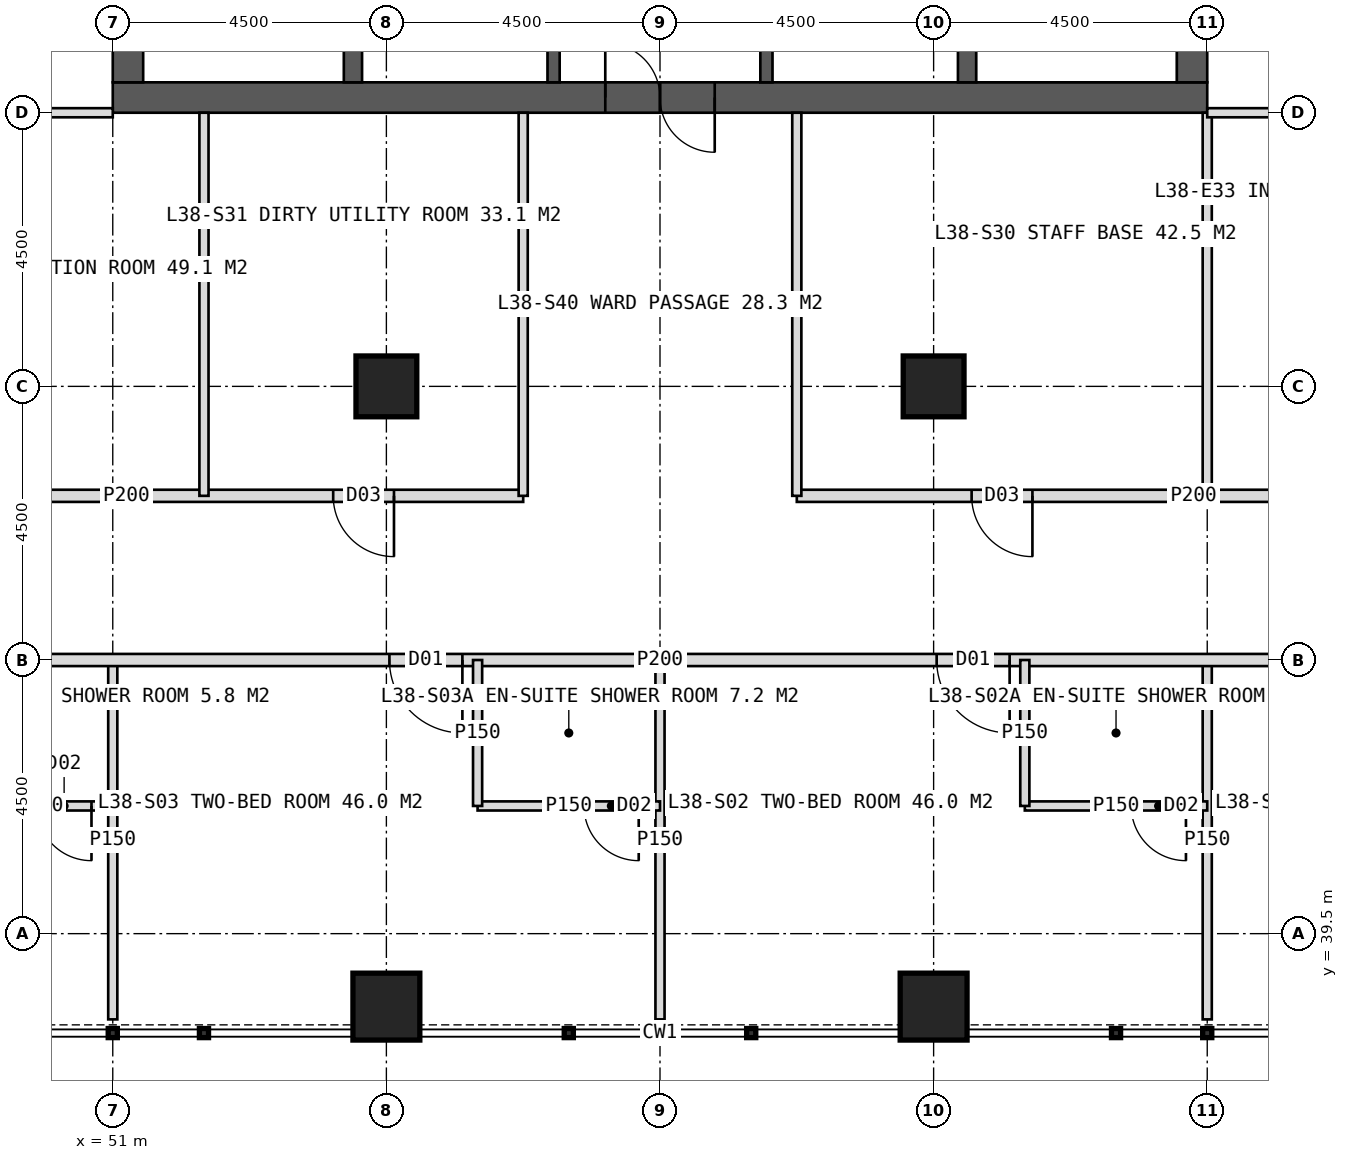
"""IFC4 building model, lengths in metres.
Left out: names, types, materials, properties, quantities, classifications, styles, units other than length and angle.
Written with IfcOpenShell. Run it as: python <this file> out.ifc"""

import sys

from ifc_helpers import new_model, si_unit, direction, frame, frame_2d, origin, origin_2d, place, context, subcontext, project, spatial, rectangle, hollow_rectangle, extrude, element, fill, save


model = new_model("IFC4")
c1 = context("Model", 3, precision=1e-05, world=origin(), true_north=direction((0.0, 1.0)))
c2 = subcontext(c1, "Body", "Model", "MODEL_VIEW")
j1 = project(units=[si_unit("LENGTHUNIT", "METRE"), si_unit("PLANEANGLEUNIT", "RADIAN")], contexts=[c1])
p1 = place(None, origin())
s1 = spatial("IfcSite", under=j1, at=p1, CompositionType="ELEMENT")
p2 = place(p1, origin())
s2 = spatial("IfcBuilding", under=s1, at=p2, CompositionType="ELEMENT")
p3 = place(p2, frame((0.0, 0.0, 160.0)))
s3 = spatial("IfcBuildingStorey", under=s2, at=p3, CompositionType="ELEMENT", Elevation=160.0)
p4 = place(p3, frame((51.0, 53.25, 0.0), z_axis=(0.0, 0.0, 1.0), x_axis=(1.0, 0.0, 0.0)))
e1 = element("IfcWall", 1, at=p4, inside=s3, PredefinedType="SHEAR", context=c2, shape_type="SweptSolid", body=[
    extrude(rectangle(XDim=18.0, YDim=0.5, at=frame_2d((9.0, 0.0))), origin(), (0.0, 0.0, 1.0), 4.0),
])
p5 = place(p4, frame((8.1, 0.0, 0.0)))
e2 = element("IfcOpeningElement", 2, at=p5, cuts=e1, PredefinedType="OPENING", context=c2, shape_type="SweptSolid", body=[
    extrude(rectangle(XDim=1.8, YDim=2.2, at=frame_2d((0.9, 1.1))), frame((0.0, 0.26, 0.0), z_axis=(0.0, -1.0, 0.0), x_axis=(1.0, 0.0, 0.0)), (0.0, 0.0, 1.0), 0.52),
])
p6 = place(p3, frame((51.25, 53.5, 0.0), z_axis=(0.0, 0.0, 1.0), x_axis=(0.0, 1.0, 0.0)))
e3 = element("IfcWall", 3, at=p6, inside=s3, PredefinedType="SHEAR", context=c2, shape_type="SweptSolid", body=[
    extrude(rectangle(XDim=17.0, YDim=0.5, at=frame_2d((8.5, 0.0))), origin(), (0.0, 0.0, 1.0), 4.0),
])
p7 = place(p6, frame((6.0, 0.0, 0.0)))
e4 = element("IfcOpeningElement", 4, at=p7, cuts=e3, PredefinedType="OPENING", context=c2, shape_type="SweptSolid", body=[
    extrude(rectangle(XDim=1.5, YDim=2.2, at=frame_2d((0.75, 1.1))), frame((0.0, 0.26, 0.0), z_axis=(0.0, -1.0, 0.0), x_axis=(1.0, 0.0, 0.0)), (0.0, 0.0, 1.0), 0.52),
])
p8 = place(p3, frame((68.75, 53.5, 0.0), z_axis=(0.0, 0.0, 1.0), x_axis=(0.0, 1.0, 0.0)))
e5 = element("IfcWall", 5, at=p8, inside=s3, PredefinedType="SHEAR", context=c2, shape_type="SweptSolid", body=[
    extrude(rectangle(XDim=17.0, YDim=0.5, at=frame_2d((8.5, 0.0))), origin(), (0.0, 0.0, 1.0), 4.0),
])
p9 = place(p8, frame((9.5, 0.0, 0.0)))
e6 = element("IfcOpeningElement", 6, at=p9, cuts=e5, PredefinedType="OPENING", context=c2, shape_type="SweptSolid", body=[
    extrude(rectangle(XDim=1.5, YDim=2.2, at=frame_2d((0.75, 1.1))), frame((0.0, 0.26, 0.0), z_axis=(0.0, -1.0, 0.0), x_axis=(1.0, 0.0, 0.0)), (0.0, 0.0, 1.0), 0.52),
])
for number, where, z_axis, x_axis in (
    (7, (54.95, 53.5, 0.0), (0.0, 0.0, 1.0), (0.0, 1.0, 0.0)),
    (8, (65.05, 53.5, 0.0), (0.0, 0.0, 1.0), (0.0, 1.0, 0.0)),
):
    element("IfcWall", number, at=place(p3, frame(where, z_axis=z_axis, x_axis=x_axis)), inside=s3, PredefinedType="SHEAR", context=c2, shape_type="SweptSolid", body=[
        extrude(rectangle(XDim=17.0, YDim=0.3, at=frame_2d((8.5, 0.0))), origin(), (0.0, 0.0, 1.0), 4.0),
    ])
p10 = place(p3, frame((58.25, 53.5, 0.0), z_axis=(0.0, 0.0, 1.0), x_axis=(0.0, 1.0, 0.0)))
e9 = element("IfcWall", 9, at=p10, inside=s3, PredefinedType="SHEAR", context=c2, shape_type="SweptSolid", body=[
    extrude(rectangle(XDim=17.0, YDim=0.2, at=frame_2d((8.5, 0.0))), origin(), (0.0, 0.0, 1.0), 4.0),
])
p11 = place(p10, frame((1.375, 0.0, 0.0)))
e10 = element("IfcOpeningElement", 10, at=p11, cuts=e9, PredefinedType="OPENING", context=c2, shape_type="SweptSolid", body=[
    extrude(rectangle(XDim=1.4, YDim=2.2, at=frame_2d((0.7, 1.1))), frame((0.0, 0.11, 0.0), z_axis=(0.0, -1.0, 0.0), x_axis=(1.0, 0.0, 0.0)), (0.0, 0.0, 1.0), 0.22),
])
p12 = place(p10, frame((5.675, 0.0, 0.0)))
e11 = element("IfcOpeningElement", 11, at=p12, cuts=e9, PredefinedType="OPENING", context=c2, shape_type="SweptSolid", body=[
    extrude(rectangle(XDim=1.4, YDim=2.2, at=frame_2d((0.7, 1.1))), frame((0.0, 0.11, 0.0), z_axis=(0.0, -1.0, 0.0), x_axis=(1.0, 0.0, 0.0)), (0.0, 0.0, 1.0), 0.22),
])
p13 = place(p3, frame((61.75, 53.5, 0.0), z_axis=(0.0, 0.0, 1.0), x_axis=(0.0, 1.0, 0.0)))
e12 = element("IfcWall", 12, at=p13, inside=s3, PredefinedType="SHEAR", context=c2, shape_type="SweptSolid", body=[
    extrude(rectangle(XDim=17.0, YDim=0.2, at=frame_2d((8.5, 0.0))), origin(), (0.0, 0.0, 1.0), 4.0),
])
p14 = place(p13, frame((1.375, 0.0, 0.0)))
e13 = element("IfcOpeningElement", 13, at=p14, cuts=e12, PredefinedType="OPENING", context=c2, shape_type="SweptSolid", body=[
    extrude(rectangle(XDim=1.4, YDim=2.2, at=frame_2d((0.7, 1.1))), frame((0.0, 0.11, 0.0), z_axis=(0.0, -1.0, 0.0), x_axis=(1.0, 0.0, 0.0)), (0.0, 0.0, 1.0), 0.22),
])
p15 = place(p13, frame((5.675, 0.0, 0.0)))
e14 = element("IfcOpeningElement", 14, at=p15, cuts=e12, PredefinedType="OPENING", context=c2, shape_type="SweptSolid", body=[
    extrude(rectangle(XDim=1.4, YDim=2.2, at=frame_2d((0.7, 1.1))), frame((0.0, 0.11, 0.0), z_axis=(0.0, -1.0, 0.0), x_axis=(1.0, 0.0, 0.0)), (0.0, 0.0, 1.0), 0.22),
])
for number, where, z_axis, x_axis in (
    (15, (55.5, 48.5, 0.0), (0.0, 0.0, 1.0), (1.0, 0.0, 0.0)),
    (16, (64.5, 48.5, 0.0), (0.0, 0.0, 1.0), (1.0, 0.0, 0.0)),
):
    element("IfcColumn", number, at=place(p3, frame(where, z_axis=z_axis, x_axis=x_axis)), inside=s3, PredefinedType="COLUMN", context=c2, shape_type="SweptSolid", body=[
        extrude(hollow_rectangle(XDim=1.0, YDim=1.0, WallThickness=0.1, at=origin_2d()), origin(), (0.0, 0.0, 1.0), 4.0),
    ])
for number, where, z_axis, x_axis in (
    (17, (55.5, 38.3, 0.0), (0.0, 0.0, 1.0), (1.0, 0.0, 0.0)),
    (18, (64.5, 38.3, 0.0), (0.0, 0.0, 1.0), (1.0, 0.0, 0.0)),
):
    element("IfcColumn", number, at=place(p3, frame(where, z_axis=z_axis, x_axis=x_axis)), inside=s3, PredefinedType="COLUMN", context=c2, shape_type="SweptSolid", body=[
        extrude(hollow_rectangle(XDim=1.1, YDim=1.1, WallThickness=0.1, at=origin_2d()), origin(), (0.0, 0.0, 1.0), 4.0),
    ])
p16 = place(p3, frame((51.0, 53.0, 0.0), z_axis=(0.0, 0.0, 1.0), x_axis=(-1.0, 0.0, 0.0)))
e19 = element("IfcWall", 19, at=p16, inside=s3, PredefinedType="PARTITIONING", context=c2, shape_type="SweptSolid", body=[
    extrude(rectangle(XDim=6.3, YDim=0.15, at=frame_2d((3.15, 0.0))), origin(), (0.0, 0.0, 1.0), 3.75),
])
p17 = place(p3, frame((69.0, 44.0, 0.0), z_axis=(0.0, 0.0, 1.0), x_axis=(0.0, -1.0, 0.0)))
e20 = element("IfcWall", 20, at=p17, inside=s3, PredefinedType="PARTITIONING", context=c2, shape_type="SweptSolid", body=[
    extrude(rectangle(XDim=5.91, YDim=0.15, at=frame_2d((2.955, 0.0))), origin(), (0.0, 0.0, 1.0), 3.75),
])
p18 = place(p3, frame((60.0, 44.0, 0.0), z_axis=(0.0, 0.0, 1.0), x_axis=(0.0, -1.0, 0.0)))
e21 = element("IfcWall", 21, at=p18, inside=s3, PredefinedType="PARTITIONING", context=c2, shape_type="SweptSolid", body=[
    extrude(rectangle(XDim=5.91, YDim=0.15, at=frame_2d((2.955, 0.0))), origin(), (0.0, 0.0, 1.0), 2.95),
])
p19 = place(p3, frame((51.0, 44.0, 0.0), z_axis=(0.0, 0.0, 1.0), x_axis=(0.0, -1.0, 0.0)))
e22 = element("IfcWall", 22, at=p19, inside=s3, PredefinedType="PARTITIONING", context=c2, shape_type="SweptSolid", body=[
    extrude(rectangle(XDim=5.91, YDim=0.15, at=frame_2d((2.955, 0.0))), origin(), (0.0, 0.0, 1.0), 3.75),
])
p20 = place(p3, frame((78.0, 44.0, 0.0), z_axis=(0.0, 0.0, 1.0), x_axis=(-1.0, 0.0, 0.0)))
e23 = element("IfcWall", 23, at=p20, inside=s3, PredefinedType="PARTITIONING", context=c2, shape_type="SweptSolid", body=[
    extrude(rectangle(XDim=36.0, YDim=0.2, at=frame_2d((18.0, 0.0))), origin(), (0.0, 0.0, 1.0), 3.75),
])
p21 = place(p20, frame((3.25, 0.0, 0.0)))
e24 = element("IfcOpeningElement", 24, at=p21, cuts=e23, PredefinedType="OPENING", context=c2, shape_type="SweptSolid", body=[
    extrude(rectangle(XDim=1.2, YDim=2.2, at=frame_2d((0.6, 1.1))), frame((0.0, 0.11, 0.0), z_axis=(0.0, -1.0, 0.0), x_axis=(1.0, 0.0, 0.0)), (0.0, 0.0, 1.0), 0.22),
])
p22 = place(p20, frame((12.25, 0.0, 0.0)))
e25 = element("IfcOpeningElement", 25, at=p22, cuts=e23, PredefinedType="OPENING", context=c2, shape_type="SweptSolid", body=[
    extrude(rectangle(XDim=1.2, YDim=2.2, at=frame_2d((0.6, 1.1))), frame((0.0, 0.11, 0.0), z_axis=(0.0, -1.0, 0.0), x_axis=(1.0, 0.0, 0.0)), (0.0, 0.0, 1.0), 0.22),
])
p23 = place(p20, frame((21.25, 0.0, 0.0)))
e26 = element("IfcOpeningElement", 26, at=p23, cuts=e23, PredefinedType="OPENING", context=c2, shape_type="SweptSolid", body=[
    extrude(rectangle(XDim=1.2, YDim=2.2, at=frame_2d((0.6, 1.1))), frame((0.0, 0.11, 0.0), z_axis=(0.0, -1.0, 0.0), x_axis=(1.0, 0.0, 0.0)), (0.0, 0.0, 1.0), 0.22),
])
p24 = place(p20, frame((29.65, 0.0, 0.0)))
e27 = element("IfcOpeningElement", 27, at=p24, cuts=e23, PredefinedType="OPENING", context=c2, shape_type="SweptSolid", body=[
    extrude(rectangle(XDim=1.2, YDim=2.2, at=frame_2d((0.6, 1.1))), frame((0.0, 0.11, 0.0), z_axis=(0.0, -1.0, 0.0), x_axis=(1.0, 0.0, 0.0)), (0.0, 0.0, 1.0), 0.22),
])
p25 = place(p3, frame((69.0, 41.6, 0.0), z_axis=(0.0, 0.0, 1.0), x_axis=(-1.0, 0.0, 0.0)))
e28 = element("IfcWall", 28, at=p25, inside=s3, PredefinedType="PARTITIONING", context=c2, shape_type="SweptSolid", body=[
    extrude(rectangle(XDim=3.0, YDim=0.15, at=frame_2d((1.5, 0.0))), origin(), (0.0, 0.0, 1.0), 3.75),
])
p26 = place(p25, frame((0.35, 0.0, 0.0)))
e29 = element("IfcOpeningElement", 29, at=p26, cuts=e28, PredefinedType="OPENING", context=c2, shape_type="SweptSolid", body=[
    extrude(rectangle(XDim=0.9, YDim=2.1, at=frame_2d((0.45, 1.05))), frame((0.0, 0.085, 0.0), z_axis=(0.0, -1.0, 0.0), x_axis=(1.0, 0.0, 0.0)), (0.0, 0.0, 1.0), 0.17),
])
p27 = place(p3, frame((66.0, 44.0, 0.0), z_axis=(0.0, 0.0, 1.0), x_axis=(0.0, -1.0, 0.0)))
e30 = element("IfcWall", 30, at=p27, inside=s3, PredefinedType="PARTITIONING", context=c2, shape_type="SweptSolid", body=[
    extrude(rectangle(XDim=2.4, YDim=0.15, at=frame_2d((1.2, 0.0))), origin(), (0.0, 0.0, 1.0), 3.75),
])
p28 = place(p3, frame((60.0, 41.6, 0.0), z_axis=(0.0, 0.0, 1.0), x_axis=(-1.0, 0.0, 0.0)))
e31 = element("IfcWall", 31, at=p28, inside=s3, PredefinedType="PARTITIONING", context=c2, shape_type="SweptSolid", body=[
    extrude(rectangle(XDim=3.0, YDim=0.15, at=frame_2d((1.5, 0.0))), origin(), (0.0, 0.0, 1.0), 3.75),
])
p29 = place(p28, frame((0.35, 0.0, 0.0)))
e32 = element("IfcOpeningElement", 32, at=p29, cuts=e31, PredefinedType="OPENING", context=c2, shape_type="SweptSolid", body=[
    extrude(rectangle(XDim=0.9, YDim=2.1, at=frame_2d((0.45, 1.05))), frame((0.0, 0.085, 0.0), z_axis=(0.0, -1.0, 0.0), x_axis=(1.0, 0.0, 0.0)), (0.0, 0.0, 1.0), 0.17),
])
p30 = place(p3, frame((57.0, 44.0, 0.0), z_axis=(0.0, 0.0, 1.0), x_axis=(0.0, -1.0, 0.0)))
e33 = element("IfcWall", 33, at=p30, inside=s3, PredefinedType="PARTITIONING", context=c2, shape_type="SweptSolid", body=[
    extrude(rectangle(XDim=2.4, YDim=0.15, at=frame_2d((1.2, 0.0))), origin(), (0.0, 0.0, 1.0), 3.75),
])
p31 = place(p3, frame((51.0, 41.6, 0.0), z_axis=(0.0, 0.0, 1.0), x_axis=(-1.0, 0.0, 0.0)))
e34 = element("IfcWall", 34, at=p31, inside=s3, PredefinedType="PARTITIONING", context=c2, shape_type="SweptSolid", body=[
    extrude(rectangle(XDim=2.4, YDim=0.15, at=frame_2d((1.2, 0.0))), origin(), (0.0, 0.0, 1.0), 3.75),
])
p32 = place(p31, frame((0.35, 0.0, 0.0)))
e35 = element("IfcOpeningElement", 35, at=p32, cuts=e34, PredefinedType="OPENING", context=c2, shape_type="SweptSolid", body=[
    extrude(rectangle(XDim=0.9, YDim=2.1, at=frame_2d((0.45, 1.05))), frame((0.0, 0.085, 0.0), z_axis=(0.0, -1.0, 0.0), x_axis=(1.0, 0.0, 0.0)), (0.0, 0.0, 1.0), 0.17),
])
p33 = place(p3, frame((69.0, 53.0, 0.0), z_axis=(0.0, 0.0, 1.0), x_axis=(0.0, -1.0, 0.0)))
e36 = element("IfcWall", 36, at=p33, inside=s3, PredefinedType="PARTITIONING", context=c2, shape_type="SweptSolid", body=[
    extrude(rectangle(XDim=6.3, YDim=0.15, at=frame_2d((3.15, 0.0))), origin(), (0.0, 0.0, 1.0), 3.75),
])
p34 = place(p3, frame((75.3, 46.7, 0.0), z_axis=(0.0, 0.0, 1.0), x_axis=(-1.0, 0.0, 0.0)))
e37 = element("IfcWall", 37, at=p34, inside=s3, PredefinedType="PARTITIONING", context=c2, shape_type="SweptSolid", body=[
    extrude(rectangle(XDim=13.05, YDim=0.2, at=frame_2d((6.525, 0.0))), origin(), (0.0, 0.0, 1.0), 3.75),
])
p35 = place(p34, frame((9.175, 0.0, 0.0)))
e38 = element("IfcOpeningElement", 38, at=p35, cuts=e37, PredefinedType="OPENING", context=c2, shape_type="SweptSolid", body=[
    extrude(rectangle(XDim=1.0, YDim=2.1, at=frame_2d((0.5, 1.05))), frame((0.0, 0.11, 0.0), z_axis=(0.0, -1.0, 0.0), x_axis=(1.0, 0.0, 0.0)), (0.0, 0.0, 1.0), 0.22),
])
p36 = place(p3, frame((57.75, 46.7, 0.0), z_axis=(0.0, 0.0, 1.0), x_axis=(-1.0, 0.0, 0.0)))
e39 = element("IfcWall", 39, at=p36, inside=s3, PredefinedType="PARTITIONING", context=c2, shape_type="SweptSolid", body=[
    extrude(rectangle(XDim=13.05, YDim=0.2, at=frame_2d((6.525, 0.0))), origin(), (0.0, 0.0, 1.0), 3.75),
])
p37 = place(p36, frame((2.125, 0.0, 0.0)))
e40 = element("IfcOpeningElement", 40, at=p37, cuts=e39, PredefinedType="OPENING", context=c2, shape_type="SweptSolid", body=[
    extrude(rectangle(XDim=1.0, YDim=2.1, at=frame_2d((0.5, 1.05))), frame((0.0, 0.11, 0.0), z_axis=(0.0, -1.0, 0.0), x_axis=(1.0, 0.0, 0.0)), (0.0, 0.0, 1.0), 0.22),
])
p38 = place(p36, frame((8.65, 0.0, 0.0)))
e41 = element("IfcOpeningElement", 41, at=p38, cuts=e39, PredefinedType="OPENING", context=c2, shape_type="SweptSolid", body=[
    extrude(rectangle(XDim=1.0, YDim=2.1, at=frame_2d((0.5, 1.05))), frame((0.0, 0.11, 0.0), z_axis=(0.0, -1.0, 0.0), x_axis=(1.0, 0.0, 0.0)), (0.0, 0.0, 1.0), 0.22),
])
for number, where, z_axis, x_axis in (
    (42, (62.25, 53.0, 0.0), (0.0, 0.0, 1.0), (0.0, -1.0, 0.0)),
    (43, (57.75, 53.0, 0.0), (0.0, 0.0, 1.0), (0.0, -1.0, 0.0)),
    (44, (52.5, 53.0, 0.0), (0.0, 0.0, 1.0), (0.0, -1.0, 0.0)),
    (45, (69.0, 53.0, 0.0), (0.0, 0.0, 1.0), (1.0, 0.0, 0.0)),
):
    element("IfcWall", number, at=place(p3, frame(where, z_axis=z_axis, x_axis=x_axis)), inside=s3, PredefinedType="PARTITIONING", context=c2, shape_type="SweptSolid", body=[
        extrude(rectangle(XDim=6.3, YDim=0.15, at=frame_2d((3.15, 0.0))), origin(), (0.0, 0.0, 1.0), 3.75),
    ])
p39 = place(p22, origin())
e46 = element("IfcDoor", 46, at=p39, inside=s3, OperationType="SINGLE_SWING_LEFT", PredefinedType="DOOR", context=c2, shape_type="SweptSolid", body=[
    extrude(rectangle(XDim=1.2, YDim=2.2, at=frame_2d((0.6, 1.1))), frame((0.0, 0.025, 0.0), z_axis=(0.0, -1.0, 0.0), x_axis=(1.0, 0.0, 0.0)), (0.0, 0.0, 1.0), 0.05),
])
fill(e25, e46)
p40 = place(p26, origin())
e47 = element("IfcDoor", 47, at=p40, inside=s3, OperationType="SINGLE_SWING_LEFT", PredefinedType="DOOR", context=c2, shape_type="SweptSolid", body=[
    extrude(rectangle(XDim=0.9, YDim=2.1, at=frame_2d((0.45, 1.05))), frame((0.0, 0.025, 0.0), z_axis=(0.0, -1.0, 0.0), x_axis=(1.0, 0.0, 0.0)), (0.0, 0.0, 1.0), 0.05),
])
fill(e29, e47)
p41 = place(p23, origin())
e48 = element("IfcDoor", 48, at=p41, inside=s3, OperationType="SINGLE_SWING_LEFT", PredefinedType="DOOR", context=c2, shape_type="SweptSolid", body=[
    extrude(rectangle(XDim=1.2, YDim=2.2, at=frame_2d((0.6, 1.1))), frame((0.0, 0.025, 0.0), z_axis=(0.0, -1.0, 0.0), x_axis=(1.0, 0.0, 0.0)), (0.0, 0.0, 1.0), 0.05),
])
fill(e26, e48)
p42 = place(p29, origin())
e49 = element("IfcDoor", 49, at=p42, inside=s3, OperationType="SINGLE_SWING_LEFT", PredefinedType="DOOR", context=c2, shape_type="SweptSolid", body=[
    extrude(rectangle(XDim=0.9, YDim=2.1, at=frame_2d((0.45, 1.05))), frame((0.0, 0.025, 0.0), z_axis=(0.0, -1.0, 0.0), x_axis=(1.0, 0.0, 0.0)), (0.0, 0.0, 1.0), 0.05),
])
fill(e32, e49)
p43 = place(p32, origin())
e50 = element("IfcDoor", 50, at=p43, inside=s3, OperationType="SINGLE_SWING_LEFT", PredefinedType="DOOR", context=c2, shape_type="SweptSolid", body=[
    extrude(rectangle(XDim=0.9, YDim=2.1, at=frame_2d((0.45, 1.05))), frame((0.0, 0.025, 0.0), z_axis=(0.0, -1.0, 0.0), x_axis=(1.0, 0.0, 0.0)), (0.0, 0.0, 1.0), 0.05),
])
fill(e35, e50)
p44 = place(p35, origin())
e51 = element("IfcDoor", 51, at=p44, inside=s3, OperationType="SINGLE_SWING_LEFT", PredefinedType="DOOR", context=c2, shape_type="SweptSolid", body=[
    extrude(rectangle(XDim=1.0, YDim=2.1, at=frame_2d((0.5, 1.05))), frame((0.0, 0.025, 0.0), z_axis=(0.0, -1.0, 0.0), x_axis=(1.0, 0.0, 0.0)), (0.0, 0.0, 1.0), 0.05),
])
fill(e38, e51)
p45 = place(p37, origin())
e52 = element("IfcDoor", 52, at=p45, inside=s3, OperationType="SINGLE_SWING_LEFT", PredefinedType="DOOR", context=c2, shape_type="SweptSolid", body=[
    extrude(rectangle(XDim=1.0, YDim=2.1, at=frame_2d((0.5, 1.05))), frame((0.0, 0.025, 0.0), z_axis=(0.0, -1.0, 0.0), x_axis=(1.0, 0.0, 0.0)), (0.0, 0.0, 1.0), 0.05),
])
fill(e40, e52)
p46 = place(p5, origin())
e53 = element("IfcDoor", 53, at=p46, inside=s3, OperationType="DOUBLE_DOOR_SINGLE_SWING", PredefinedType="DOOR", context=c2, shape_type="SweptSolid", body=[
    extrude(rectangle(XDim=1.8, YDim=2.2, at=frame_2d((0.9, 1.1))), frame((0.0, 0.025, 0.0), z_axis=(0.0, -1.0, 0.0), x_axis=(1.0, 0.0, 0.0)), (0.0, 0.0, 1.0), 0.05),
])
fill(e2, e53)
save(model, sys.argv[1])
